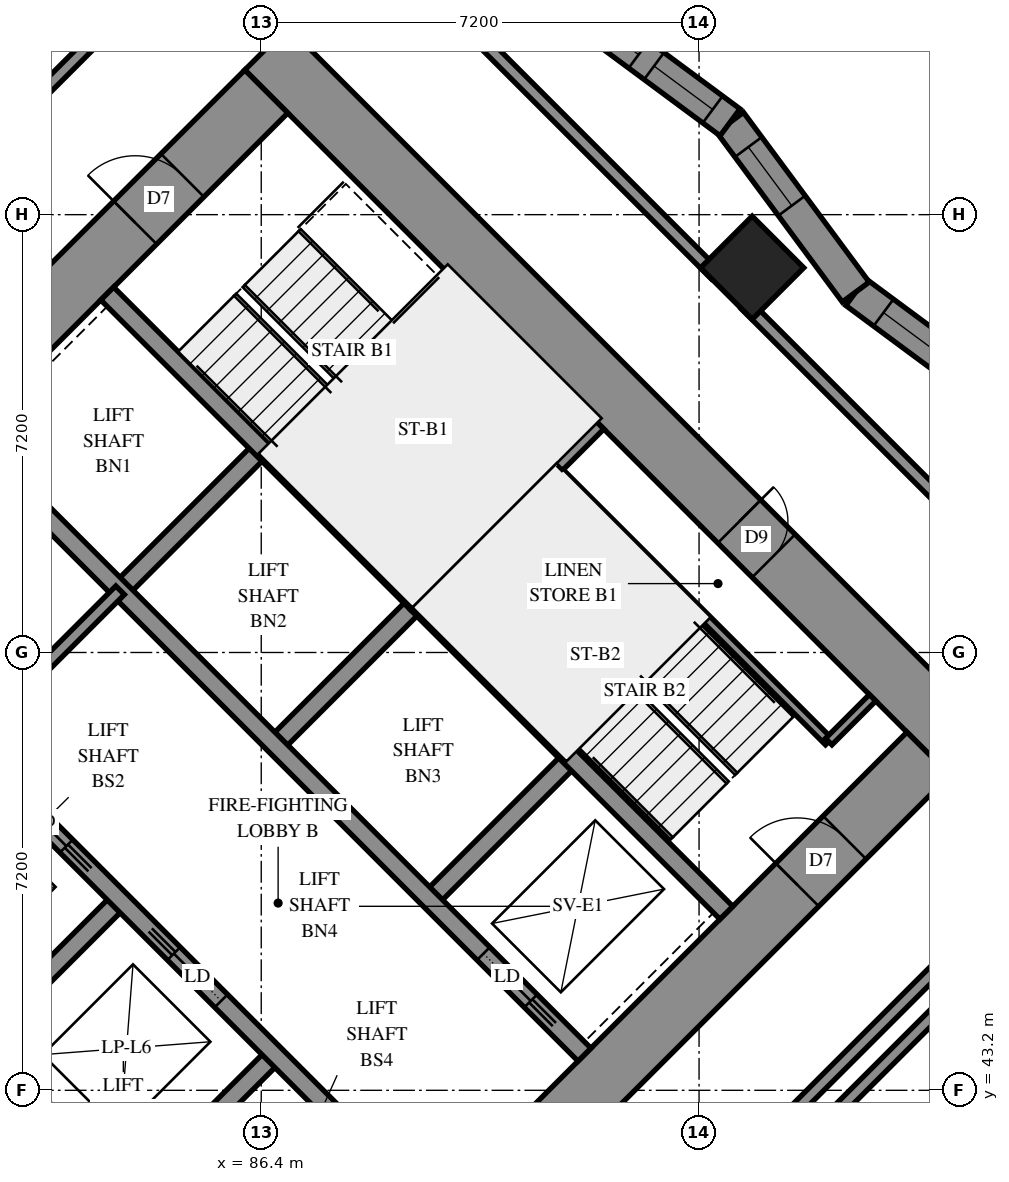
"""IFC4 building model, lengths in metres.
Left out: names, types, materials, properties, quantities, classifications, styles, units other than length and angle.
Written with IfcOpenShell. Run it as: python <this file> out.ifc"""

import sys

from ifc_helpers import new_model, si_unit, direction, frame, frame_2d, origin, origin_2d, place, context, subcontext, project, spatial, polyline, rectangle, outline, extrude, element, fill, save


model = new_model("IFC4")
c1 = context("Model", 3, precision=1e-05, world=origin(), true_north=direction((0.0, 1.0)))
c2 = subcontext(c1, "Body", "Model", "MODEL_VIEW")
j1 = project(units=[si_unit("LENGTHUNIT", "METRE"), si_unit("PLANEANGLEUNIT", "RADIAN")], contexts=[c1])
p1 = place(None, origin())
s1 = spatial("IfcSite", under=j1, at=p1, CompositionType="ELEMENT")
p2 = place(p1, origin())
s2 = spatial("IfcBuilding", under=s1, at=p2, CompositionType="ELEMENT")
p3 = place(p2, frame((0.0, 0.0, 50.8)))
s3 = spatial("IfcBuildingStorey", under=s2, at=p3, CompositionType="ELEMENT", Elevation=50.8)
p4 = place(p3, frame((94.474, 56.727, 0.0), z_axis=(0.0, 0.0, 1.0), x_axis=(0.7071067812, -0.7071067812, 0.0)))
e1 = element("IfcColumn", 1, at=p4, inside=s3, PredefinedType="COLUMN", context=c2, shape_type="SweptSolid", body=[
    extrude(rectangle(XDim=1.2, YDim=1.2, at=origin_2d()), origin(), (0.0, 0.0, 1.0), 3.1),
])
p5 = place(p3, frame((75.594, 49.443, -0.3), z_axis=(0.0, 0.0, 1.0), x_axis=(0.7071037324, -0.70710983, 0.0)))
e2 = element("IfcWall", 2, at=p5, inside=s3, PredefinedType="SHEAR", context=c2, shape_type="SweptSolid", body=[
    extrude(rectangle(XDim=16.4, YDim=1.0, at=frame_2d((8.2, 0.0))), origin(), (0.0, 0.0, 1.0), 2.7),
])
p6 = place(p3, frame((86.483, 60.333, -0.3), z_axis=(0.0, 0.0, 1.0), x_axis=(0.70710983, -0.7071037324, 0.0)))
e3 = element("IfcWall", 3, at=p6, inside=s3, PredefinedType="SHEAR", context=c2, shape_type="SweptSolid", body=[
    extrude(rectangle(XDim=16.4, YDim=1.0, at=frame_2d((8.2, 0.0))), origin(), (0.0, 0.0, 1.0), 2.7),
])
p7 = place(p6, frame((11.0, 0.0, 0.3)))
e4 = element("IfcOpeningElement", 4, at=p7, cuts=e3, PredefinedType="OPENING", context=c2, shape_type="SweptSolid", body=[
    extrude(rectangle(XDim=0.8, YDim=2.1, at=frame_2d((0.4, 1.05))), frame((0.0, 0.51, 0.0), z_axis=(0.0, -1.0, 0.0), x_axis=(1.0, 0.0, 0.0)), (0.0, 0.0, 1.0), 1.02),
])
p8 = place(p3, frame((76.301, 49.443, -0.3), z_axis=(0.0, 0.0, 1.0), x_axis=(0.7071067812, 0.7071067812, 0.0)))
e5 = element("IfcWall", 5, at=p8, inside=s3, PredefinedType="SHEAR", context=c2, shape_type="SweptSolid", body=[
    extrude(rectangle(XDim=14.4, YDim=1.0, at=frame_2d((7.2, 0.0))), origin(), (0.0, 0.0, 1.0), 2.7),
])
p9 = place(p8, frame((4.55, 0.0, 0.3)))
e6 = element("IfcOpeningElement", 6, at=p9, cuts=e5, PredefinedType="OPENING", context=c2, shape_type="SweptSolid", body=[
    extrude(rectangle(XDim=1.1, YDim=2.1, at=frame_2d((0.55, 1.05))), frame((0.0, 0.51, 0.0), z_axis=(0.0, -1.0, 0.0), x_axis=(1.0, 0.0, 0.0)), (0.0, 0.0, 1.0), 1.02),
])
p10 = place(p8, frame((11.35, 0.0, 0.3)))
e7 = element("IfcOpeningElement", 7, at=p10, cuts=e5, PredefinedType="OPENING", context=c2, shape_type="SweptSolid", body=[
    extrude(rectangle(XDim=1.1, YDim=2.1, at=frame_2d((0.55, 1.05))), frame((0.0, 0.51, 0.0), z_axis=(0.0, -1.0, 0.0), x_axis=(1.0, 0.0, 0.0)), (0.0, 0.0, 1.0), 1.02),
])
p11 = place(p3, frame((87.19, 38.554, -0.3), z_axis=(0.0, 0.0, 1.0), x_axis=(0.707103309, 0.7071102534, 0.0)))
e8 = element("IfcWall", 8, at=p11, inside=s3, PredefinedType="SHEAR", context=c2, shape_type="SweptSolid", body=[
    extrude(rectangle(XDim=14.4, YDim=1.0, at=frame_2d((7.2, 0.0))), origin(), (0.0, 0.0, 1.0), 2.7),
])
p12 = place(p11, frame((4.55, 0.0, 0.3)))
e9 = element("IfcOpeningElement", 9, at=p12, cuts=e8, PredefinedType="OPENING", context=c2, shape_type="SweptSolid", body=[
    extrude(rectangle(XDim=1.1, YDim=2.1, at=frame_2d((0.55, 1.05))), frame((0.0, 0.51, 0.0), z_axis=(0.0, -1.0, 0.0), x_axis=(1.0, 0.0, 0.0)), (0.0, 0.0, 1.0), 1.02),
])
p13 = place(p11, frame((11.35, 0.0, 0.3)))
e10 = element("IfcOpeningElement", 10, at=p13, cuts=e8, PredefinedType="OPENING", context=c2, shape_type="SweptSolid", body=[
    extrude(rectangle(XDim=1.1, YDim=2.1, at=frame_2d((0.55, 1.05))), frame((0.0, 0.51, 0.0), z_axis=(0.0, -1.0, 0.0), x_axis=(1.0, 0.0, 0.0)), (0.0, 0.0, 1.0), 1.02),
])
p14 = place(p3, frame((84.079, 51.423, 0.0), z_axis=(0.0, 0.0, 1.0), x_axis=(0.7071219326, 0.7070916295, 0.0)))
e11 = element("IfcWall", 11, at=p14, inside=s3, PredefinedType="SOLIDWALL", context=c2, shape_type="SweptSolid", body=[
    extrude(rectangle(XDim=3.3, YDim=0.3, at=frame_2d((1.65, 0.0))), origin(), (0.0, 0.0, 1.0), 3.1),
])
p15 = place(p3, frame((81.746, 43.999, 0.0), z_axis=(0.0, 0.0, 1.0), x_axis=(0.7071067812, 0.7071067812, 0.0)))
e12 = element("IfcWall", 12, at=p15, inside=s3, PredefinedType="SOLIDWALL", context=c2, shape_type="SweptSolid", body=[
    extrude(rectangle(XDim=3.3, YDim=0.3, at=frame_2d((1.65, 0.0))), origin(), (0.0, 0.0, 1.0), 3.1),
])
p16 = place(p3, frame((86.625, 48.878, 0.0), z_axis=(0.0, 0.0, 1.0), x_axis=(0.7071067812, 0.7071067812, 0.0)))
e13 = element("IfcWall", 13, at=p16, inside=s3, PredefinedType="SOLIDWALL", context=c2, shape_type="SweptSolid", body=[
    extrude(rectangle(XDim=3.3, YDim=0.3, at=frame_2d((1.65, 0.0))), origin(), (0.0, 0.0, 1.0), 3.1),
])
p17 = place(p3, frame((84.291, 41.453, 0.0), z_axis=(0.0, 0.0, 1.0), x_axis=(0.7071067812, 0.7071067812, 0.0)))
e14 = element("IfcWall", 14, at=p17, inside=s3, PredefinedType="SOLIDWALL", context=c2, shape_type="SweptSolid", body=[
    extrude(rectangle(XDim=3.3, YDim=0.3, at=frame_2d((1.65, 0.0))), origin(), (0.0, 0.0, 1.0), 3.1),
])
p18 = place(p3, frame((89.17, 46.332, 0.0), z_axis=(0.0, 0.0, 1.0), x_axis=(0.7071067812, 0.7071067812, 0.0)))
e15 = element("IfcWall", 15, at=p18, inside=s3, PredefinedType="SOLIDWALL", context=c2, shape_type="SweptSolid", body=[
    extrude(rectangle(XDim=3.3, YDim=0.3, at=frame_2d((1.65, 0.0))), origin(), (0.0, 0.0, 1.0), 3.1),
])
p19 = place(p3, frame((78.988, 51.423, 0.0), z_axis=(0.0, 0.0, 1.0), x_axis=(0.7071067812, -0.7071067812, 0.0)))
e16 = element("IfcWall", 16, at=p19, inside=s3, PredefinedType="SOLIDWALL", context=c2, shape_type="SweptSolid", body=[
    extrude(rectangle(XDim=14.4, YDim=0.3, at=frame_2d((7.2, 0.0))), origin(), (0.0, 0.0, 1.0), 3.1),
])
p20 = place(p19, frame((1.25, 0.0, 0.0)))
e17 = element("IfcOpeningElement", 17, at=p20, cuts=e16, PredefinedType="OPENING", context=c2, shape_type="SweptSolid", body=[
    extrude(rectangle(XDim=1.1, YDim=2.1, at=frame_2d((0.55, 1.05))), frame((0.0, 0.16, 0.0), z_axis=(0.0, -1.0, 0.0), x_axis=(1.0, 0.0, 0.0)), (0.0, 0.0, 1.0), 0.32),
])
p21 = place(p19, frame((4.85, 0.0, 0.0)))
e18 = element("IfcOpeningElement", 18, at=p21, cuts=e16, PredefinedType="OPENING", context=c2, shape_type="SweptSolid", body=[
    extrude(rectangle(XDim=1.1, YDim=2.1, at=frame_2d((0.55, 1.05))), frame((0.0, 0.16, 0.0), z_axis=(0.0, -1.0, 0.0), x_axis=(1.0, 0.0, 0.0)), (0.0, 0.0, 1.0), 0.32),
])
p22 = place(p19, frame((8.45, 0.0, 0.0)))
e19 = element("IfcOpeningElement", 19, at=p22, cuts=e16, PredefinedType="OPENING", context=c2, shape_type="SweptSolid", body=[
    extrude(rectangle(XDim=1.1, YDim=2.1, at=frame_2d((0.55, 1.05))), frame((0.0, 0.16, 0.0), z_axis=(0.0, -1.0, 0.0), x_axis=(1.0, 0.0, 0.0)), (0.0, 0.0, 1.0), 0.32),
])
p23 = place(p19, frame((12.05, 0.0, 0.0)))
e20 = element("IfcOpeningElement", 20, at=p23, cuts=e16, PredefinedType="OPENING", context=c2, shape_type="SweptSolid", body=[
    extrude(rectangle(XDim=1.1, YDim=2.1, at=frame_2d((0.55, 1.05))), frame((0.0, 0.16, 0.0), z_axis=(0.0, -1.0, 0.0), x_axis=(1.0, 0.0, 0.0)), (0.0, 0.0, 1.0), 0.32),
])
p24 = place(p3, frame((81.534, 53.969, 0.0), z_axis=(0.0, 0.0, 1.0), x_axis=(0.707103309, -0.7071102534, 0.0)))
e21 = element("IfcWall", 21, at=p24, inside=s3, PredefinedType="SOLIDWALL", context=c2, shape_type="SweptSolid", body=[
    extrude(rectangle(XDim=14.4, YDim=0.3, at=frame_2d((7.2, 0.0))), origin(), (0.0, 0.0, 1.0), 3.1),
])
p25 = place(p24, frame((12.05, 0.0, 0.0)))
e22 = element("IfcOpeningElement", 22, at=p25, cuts=e21, PredefinedType="OPENING", context=c2, shape_type="SweptSolid", body=[
    extrude(rectangle(XDim=1.1, YDim=2.1, at=frame_2d((0.55, 1.05))), frame((0.0, 0.16, 0.0), z_axis=(0.0, -1.0, 0.0), x_axis=(1.0, 0.0, 0.0)), (0.0, 0.0, 1.0), 0.32),
])
for number, where, z_axis, x_axis in (
    (23, (83.867, 56.302, 0.0), (0.0, 0.0, 1.0), (0.707, -0.707, 0.0)),
    (24, (88.958, 51.211, 0.0), (0.0, 0.0, 1.0), (0.707, -0.707, 0.0)),
):
    element("IfcWall", number, at=place(p3, frame(where, z_axis=z_axis, x_axis=x_axis)), inside=s3, PredefinedType="SOLIDWALL", context=c2, shape_type="SweptSolid", body=[
        extrude(rectangle(XDim=7.2, YDim=0.3, at=frame_2d((3.6, 0.0))), origin(), (0.0, 0.0, 1.0), 3.1),
    ])
p26 = place(p3, frame((88.958, 51.211, 0.0), z_axis=(0.0, 0.0, 1.0), x_axis=(0.7071067812, 0.7071067812, 0.0)))
e25 = element("IfcWall", 25, at=p26, inside=s3, PredefinedType="SOLIDWALL", context=c2, shape_type="SweptSolid", body=[
    extrude(rectangle(XDim=4.2, YDim=0.3, at=frame_2d((2.1, 0.0))), origin(), (0.0, 0.0, 1.0), 3.1),
])
p27 = place(p3, frame((98.967, 54.261, 0.0), z_axis=(0.0, 0.0, 1.0), x_axis=(-0.8036306404, 0.5951283843, 0.0)))
e26 = element("IfcWall", 26, at=p27, inside=s3, PredefinedType="SOLIDWALL", context=c2, shape_type="SweptSolid", body=[
    extrude(outline(polyline([(-0.041, -0.275), (3.432, -0.275), (3.514, 0.275), (0.041, 0.275), (-0.041, -0.275)])), origin(), (0.0, 0.0, 1.0), 3.1),
])
p28 = place(p27, frame((1.704, 0.0, 0.5)))
e27 = element("IfcOpeningElement", 27, at=p28, cuts=e26, PredefinedType="OPENING", context=c2, shape_type="SweptSolid", body=[
    extrude(rectangle(XDim=1.2, YDim=2.45, at=frame_2d((0.6, 1.225))), frame((0.0, 0.285, 0.0), z_axis=(0.0, -1.0, 0.0), x_axis=(1.0, 0.0, 0.0)), (0.0, 0.0, 1.0), 0.57),
])
p29 = place(p3, frame((96.176, 56.328, 0.0), z_axis=(0.0, 0.0, 1.0), x_axis=(-0.5951235593, 0.8036342136, 0.0)))
e28 = element("IfcWall", 28, at=p29, inside=s3, PredefinedType="SOLIDWALL", context=c2, shape_type="SweptSolid", body=[
    extrude(outline(polyline([(0.041, -0.275), (3.514, -0.275), (3.432, 0.275), (-0.041, 0.275), (0.041, -0.275)])), origin(), (0.0, 0.0, 1.0), 3.1),
])
p30 = place(p29, frame((1.767, 0.0, 0.5)))
e29 = element("IfcOpeningElement", 29, at=p30, cuts=e28, PredefinedType="OPENING", context=c2, shape_type="SweptSolid", body=[
    extrude(rectangle(XDim=1.2, YDim=2.45, at=frame_2d((0.6, 1.225))), frame((0.0, 0.285, 0.0), z_axis=(0.0, -1.0, 0.0), x_axis=(1.0, 0.0, 0.0)), (0.0, 0.0, 1.0), 0.57),
])
p31 = place(p3, frame((94.11, 59.118, 0.0), z_axis=(0.0, 0.0, 1.0), x_axis=(-0.8036306404, 0.5951283843, 0.0)))
e30 = element("IfcWall", 30, at=p31, inside=s3, PredefinedType="SOLIDWALL", context=c2, shape_type="SweptSolid", body=[
    extrude(outline(polyline([(-0.041, -0.275), (3.432, -0.275), (3.514, 0.275), (0.041, 0.275), (-0.041, -0.275)])), origin(), (0.0, 0.0, 1.0), 3.1),
])
p32 = place(p31, frame((0.355, 0.0, 0.5)))
e31 = element("IfcOpeningElement", 31, at=p32, cuts=e30, PredefinedType="OPENING", context=c2, shape_type="SweptSolid", body=[
    extrude(rectangle(XDim=1.2, YDim=2.45, at=frame_2d((0.6, 1.225))), frame((0.0, 0.285, 0.0), z_axis=(0.0, -1.0, 0.0), x_axis=(1.0, 0.0, 0.0)), (0.0, 0.0, 1.0), 0.57),
])
p33 = place(p31, frame((1.871, 0.0, 0.5)))
e32 = element("IfcOpeningElement", 32, at=p33, cuts=e30, PredefinedType="OPENING", context=c2, shape_type="SweptSolid", body=[
    extrude(rectangle(XDim=1.2, YDim=2.45, at=frame_2d((0.6, 1.225))), frame((0.0, 0.285, 0.0), z_axis=(0.0, -1.0, 0.0), x_axis=(1.0, 0.0, 0.0)), (0.0, 0.0, 1.0), 0.57),
])
p34 = place(p3, frame((91.313, 53.354, 0.0), z_axis=(0.0, 0.0, 1.0), x_axis=(0.7071147811, -0.7070987812, 0.0)))
e33 = element("IfcWall", 33, at=p34, inside=s3, PredefinedType="PARTITIONING", context=c2, shape_type="SweptSolid", body=[
    extrude(rectangle(XDim=6.25, YDim=0.15, at=frame_2d((3.125, 0.0))), origin(), (0.0, 0.0, 1.0), 3.1),
])
p35 = place(p3, frame((95.732, 48.934, 0.0), z_axis=(0.0, 0.0, 1.0), x_axis=(0.7071067812, 0.7071067812, 0.0)))
e34 = element("IfcWall", 34, at=p35, inside=s3, PredefinedType="PARTITIONING", context=c2, shape_type="SweptSolid", body=[
    extrude(rectangle(XDim=1.02, YDim=0.15, at=frame_2d((0.51, 0.0))), origin(), (0.0, 0.0, 1.0), 3.1),
])
p36 = place(p3, frame((81.534, 48.878, 0.0), z_axis=(0.0, 0.0, 1.0), x_axis=(0.707092892, 0.7071206701, 0.0)))
e35 = element("IfcWall", 35, at=p36, inside=s3, PredefinedType="PARTITIONING", context=c2, shape_type="SweptSolid", body=[
    extrude(rectangle(XDim=3.6, YDim=0.2, at=frame_2d((1.8, 0.0))), origin(), (0.0, 0.0, 1.0), 3.1),
])
p37 = place(p3, frame((95.109, 42.091, 0.0), z_axis=(0.0, 0.0, 1.0), x_axis=(0.7071113651, 0.7071021972, 0.0)))
e36 = element("IfcWall", 36, at=p37, inside=s3, PredefinedType="PARTITIONING", context=c2, shape_type="SweptSolid", body=[
    extrude(rectangle(XDim=10.908, YDim=0.2, at=frame_2d((5.454, 0.0))), origin(), (0.0, 0.0, 1.0), 3.1),
])
p38 = place(p3, frame((94.757, 42.445, 0.0), z_axis=(0.0, 0.0, 1.0), x_axis=(0.7071067812, 0.7071067812, 0.0)))
e37 = element("IfcWall", 37, at=p38, inside=s3, PredefinedType="PARTITIONING", context=c2, shape_type="SweptSolid", body=[
    extrude(rectangle(XDim=9.399, YDim=0.2, at=frame_2d((4.699, 0.0))), origin(), (0.0, 0.0, 1.0), 3.1),
])
p39 = place(p3, frame((81.052, 57.873, 0.0), z_axis=(0.0, 0.0, 1.0), x_axis=(0.7071067812, 0.7071067812, 0.0)))
e38 = element("IfcWall", 38, at=p39, inside=s3, PredefinedType="PARTITIONING", context=c2, shape_type="SweptSolid", body=[
    extrude(rectangle(XDim=8.18, YDim=0.2, at=frame_2d((4.09, 0.0))), origin(), (0.0, 0.0, 1.0), 3.1),
])
p40 = place(p39, frame((0.823, 0.0, 0.0)))
e39 = element("IfcOpeningElement", 39, at=p40, cuts=e38, PredefinedType="OPENING", context=c2, shape_type="SweptSolid", body=[
    extrude(rectangle(XDim=1.0, YDim=2.1, at=frame_2d((0.5, 1.05))), frame((0.0, 0.11, 0.0), z_axis=(0.0, -1.0, 0.0), x_axis=(1.0, 0.0, 0.0)), (0.0, 0.0, 1.0), 0.22),
])
p41 = place(p3, frame((89.271, 61.215, 0.0), z_axis=(0.0, 0.0, 1.0), x_axis=(0.7071067812, -0.7071067812, 0.0)))
e40 = element("IfcWall", 40, at=p41, inside=s3, PredefinedType="PARTITIONING", context=c2, shape_type="SweptSolid", body=[
    extrude(rectangle(XDim=6.505, YDim=0.2, at=frame_2d((3.253, 0.0))), origin(), (0.0, 0.0, 1.0), 3.1),
])
p42 = place(p3, frame((94.363, 56.123, 0.0), z_axis=(0.0, 0.0, 1.0), x_axis=(0.7071067812, -0.7071067812, 0.0)))
e41 = element("IfcWall", 41, at=p42, inside=s3, PredefinedType="PARTITIONING", context=c2, shape_type="SweptSolid", body=[
    extrude(rectangle(XDim=6.503, YDim=0.2, at=frame_2d((3.251, 0.0))), origin(), (0.0, 0.0, 1.0), 3.1),
])
p43 = place(p28, origin())
e42 = element("IfcWindow", 42, at=p43, inside=s3, PartitioningType="SINGLE_PANEL", PredefinedType="WINDOW", context=c2, shape_type="SweptSolid", body=[
    extrude(rectangle(XDim=1.2, YDim=2.45, at=frame_2d((0.6, 1.225))), frame((0.0, 0.155, 0.0), z_axis=(0.0, -1.0, 0.0), x_axis=(1.0, 0.0, 0.0)), (0.0, 0.0, 1.0), 0.06),
])
fill(e27, e42)
p44 = place(p30, origin())
e43 = element("IfcWindow", 43, at=p44, inside=s3, PartitioningType="SINGLE_PANEL", PredefinedType="WINDOW", context=c2, shape_type="SweptSolid", body=[
    extrude(rectangle(XDim=1.2, YDim=2.45, at=frame_2d((0.6, 1.225))), frame((0.0, 0.155, 0.0), z_axis=(0.0, -1.0, 0.0), x_axis=(1.0, 0.0, 0.0)), (0.0, 0.0, 1.0), 0.06),
])
fill(e29, e43)
p45 = place(p32, origin())
e44 = element("IfcWindow", 44, at=p45, inside=s3, PartitioningType="SINGLE_PANEL", PredefinedType="WINDOW", context=c2, shape_type="SweptSolid", body=[
    extrude(rectangle(XDim=1.2, YDim=2.45, at=frame_2d((0.6, 1.225))), frame((0.0, 0.155, 0.0), z_axis=(0.0, -1.0, 0.0), x_axis=(1.0, 0.0, 0.0)), (0.0, 0.0, 1.0), 0.06),
])
fill(e31, e44)
p46 = place(p33, origin())
e45 = element("IfcWindow", 45, at=p46, inside=s3, PartitioningType="SINGLE_PANEL", PredefinedType="WINDOW", context=c2, shape_type="SweptSolid", body=[
    extrude(rectangle(XDim=1.2, YDim=2.45, at=frame_2d((0.6, 1.225))), frame((0.0, 0.155, 0.0), z_axis=(0.0, -1.0, 0.0), x_axis=(1.0, 0.0, 0.0)), (0.0, 0.0, 1.0), 0.06),
])
fill(e32, e45)
p47 = place(p7, origin())
e46 = element("IfcDoor", 46, at=p47, inside=s3, OperationType="SINGLE_SWING_RIGHT", PredefinedType="DOOR", context=c2, shape_type="SweptSolid", body=[
    extrude(rectangle(XDim=0.8, YDim=2.1, at=frame_2d((0.4, 1.05))), frame((0.0, -0.44, 0.0), z_axis=(0.0, -1.0, 0.0), x_axis=(1.0, 0.0, 0.0)), (0.0, 0.0, 1.0), 0.05),
])
fill(e4, e46)
p48 = place(p10, origin())
e47 = element("IfcDoor", 47, at=p48, inside=s3, OperationType="SINGLE_SWING_LEFT", PredefinedType="DOOR", context=c2, shape_type="SweptSolid", body=[
    extrude(rectangle(XDim=1.1, YDim=2.1, at=frame_2d((0.55, 1.05))), frame((0.0, 0.025, 0.0), z_axis=(0.0, -1.0, 0.0), x_axis=(1.0, 0.0, 0.0)), (0.0, 0.0, 1.0), 0.05),
])
fill(e7, e47)
p49 = place(p13, origin())
e48 = element("IfcDoor", 48, at=p49, inside=s3, OperationType="SINGLE_SWING_RIGHT", PredefinedType="DOOR", context=c2, shape_type="SweptSolid", body=[
    extrude(rectangle(XDim=1.1, YDim=2.1, at=frame_2d((0.55, 1.05))), frame((0.0, 0.025, 0.0), z_axis=(0.0, -1.0, 0.0), x_axis=(1.0, 0.0, 0.0)), (0.0, 0.0, 1.0), 0.05),
])
fill(e10, e48)
p50 = place(p21, origin())
e49 = element("IfcDoor", 49, at=p50, inside=s3, OperationType="SLIDING_TO_RIGHT", PredefinedType="DOOR", context=c2, shape_type="SweptSolid", body=[
    extrude(rectangle(XDim=1.1, YDim=2.1, at=frame_2d((0.55, 1.05))), frame((0.0, 0.025, 0.0), z_axis=(0.0, -1.0, 0.0), x_axis=(1.0, 0.0, 0.0)), (0.0, 0.0, 1.0), 0.05),
])
fill(e18, e49)
p51 = place(p22, origin())
e50 = element("IfcDoor", 50, at=p51, inside=s3, OperationType="SLIDING_TO_LEFT", PredefinedType="DOOR", context=c2, shape_type="SweptSolid", body=[
    extrude(rectangle(XDim=1.1, YDim=2.1, at=frame_2d((0.55, 1.05))), frame((0.0, 0.025, 0.0), z_axis=(0.0, -1.0, 0.0), x_axis=(1.0, 0.0, 0.0)), (0.0, 0.0, 1.0), 0.05),
])
fill(e19, e50)
p52 = place(p25, origin())
e51 = element("IfcDoor", 51, at=p52, inside=s3, OperationType="SLIDING_TO_RIGHT", PredefinedType="DOOR", context=c2, shape_type="SweptSolid", body=[
    extrude(rectangle(XDim=1.1, YDim=2.1, at=frame_2d((0.55, 1.05))), frame((0.0, 0.025, 0.0), z_axis=(0.0, -1.0, 0.0), x_axis=(1.0, 0.0, 0.0)), (0.0, 0.0, 1.0), 0.05),
])
fill(e22, e51)
save(model, sys.argv[1])
